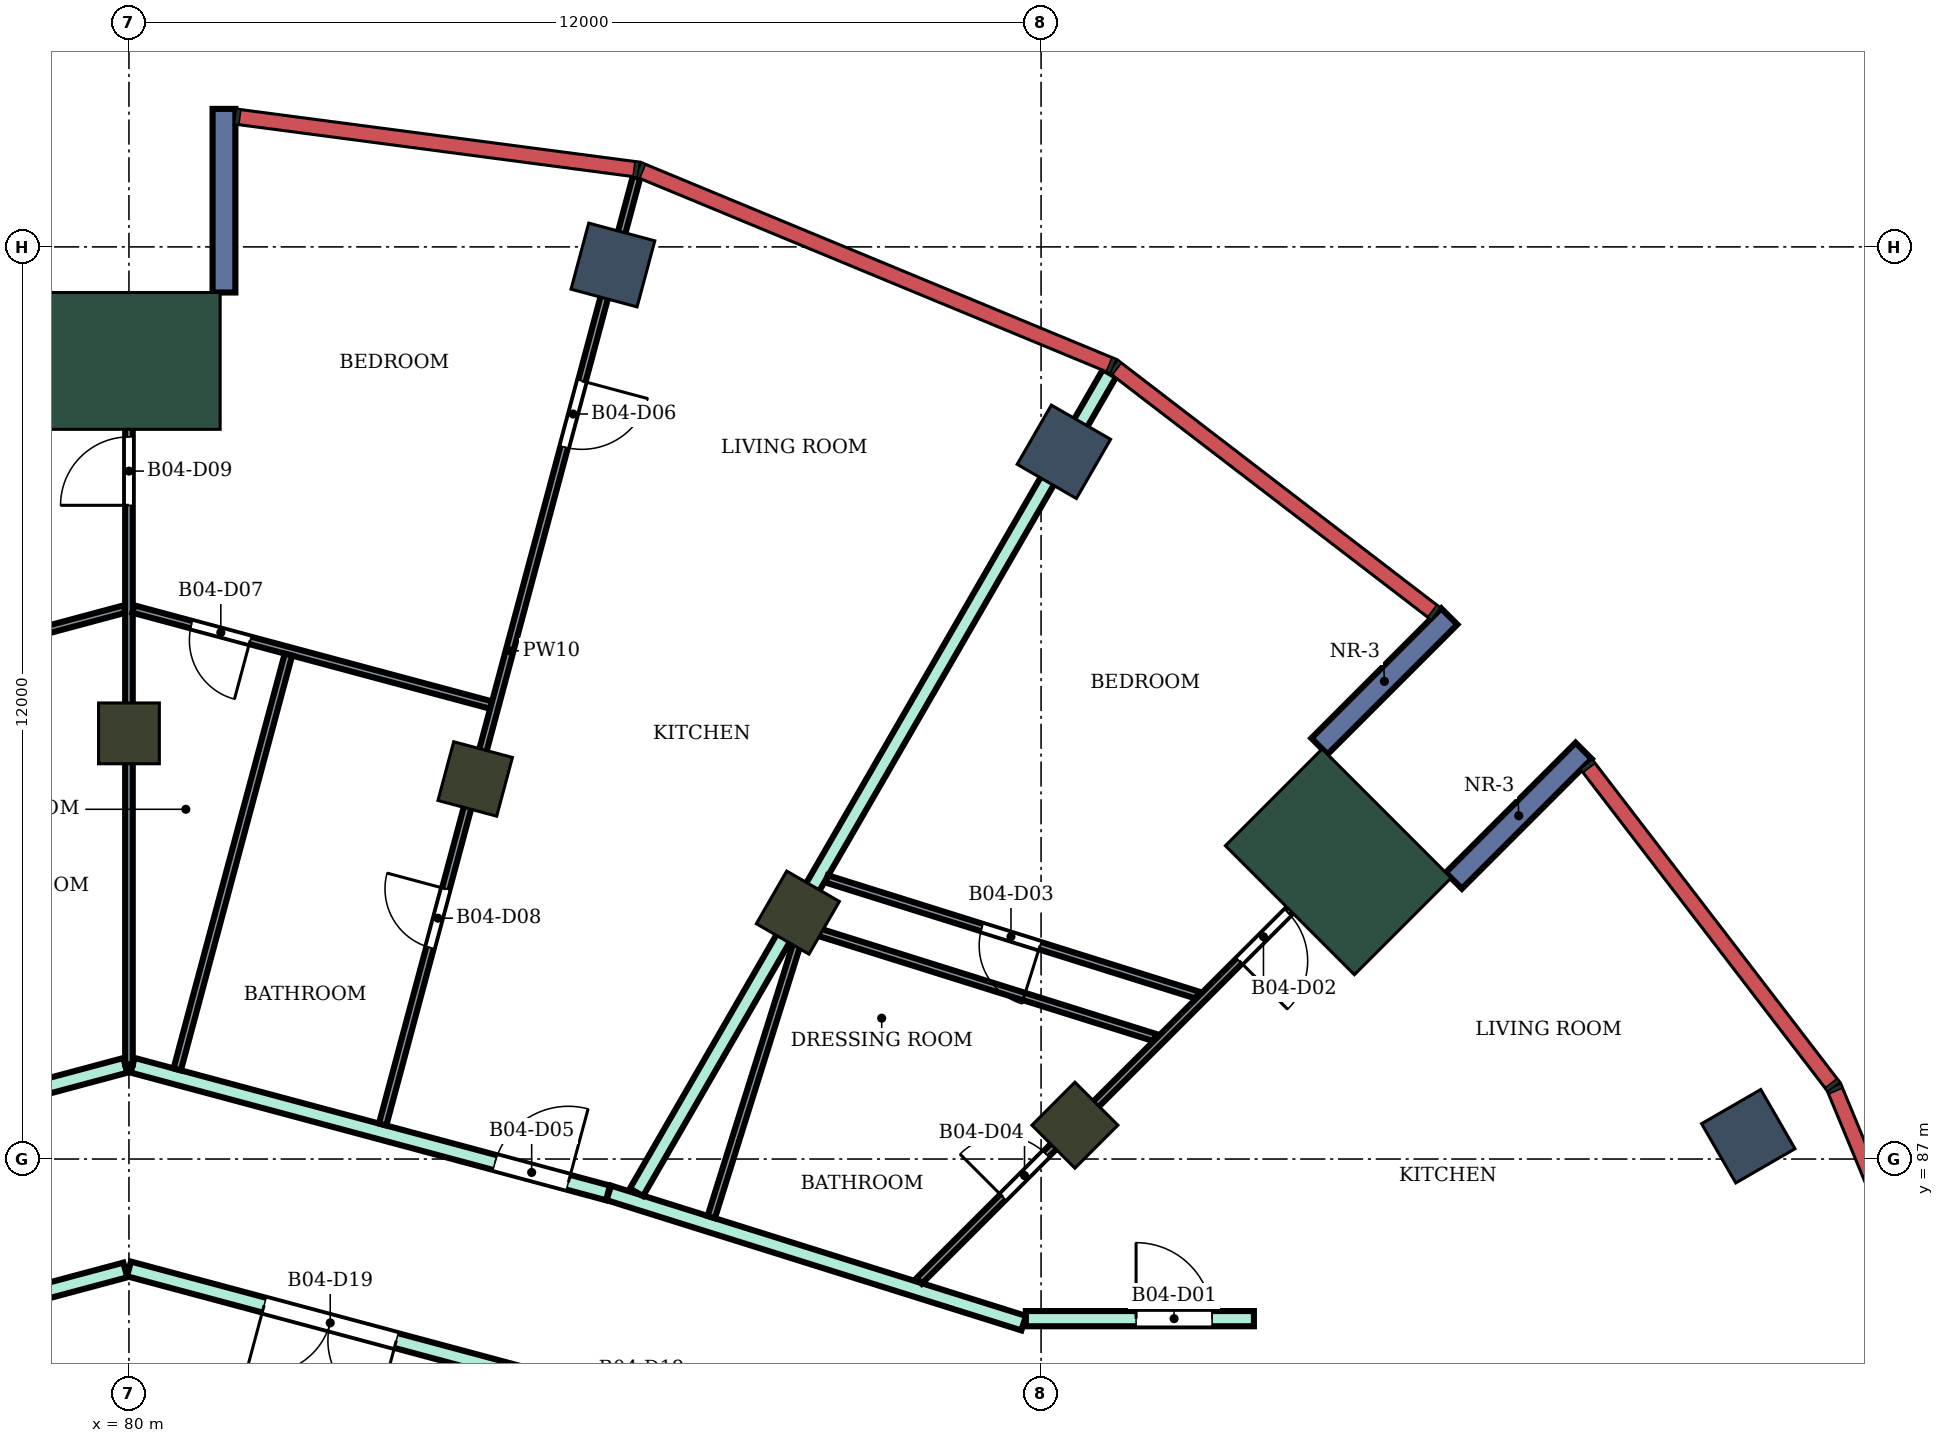
"""IFC4 building model, lengths in metres.
Left out: names, types, materials, properties, quantities, classifications, styles, units other than length and angle.
Written with IfcOpenShell. Run it as: python <this file> out.ifc"""

import sys

from ifc_helpers import new_model, si_unit, direction, frame, frame_2d, origin, origin_2d, place, context, subcontext, project, spatial, rectangle, extrude, element, fill, save


model = new_model("IFC4")
c1 = context("Model", 3, precision=1e-05, world=origin(), true_north=direction((0.0, 1.0)))
c2 = subcontext(c1, "Body", "Model", "MODEL_VIEW")
j1 = project(units=[si_unit("LENGTHUNIT", "METRE"), si_unit("PLANEANGLEUNIT", "RADIAN")], contexts=[c1])
p1 = place(None, origin())
s1 = spatial("IfcSite", under=j1, at=p1, CompositionType="ELEMENT")
p2 = place(p1, origin())
s2 = spatial("IfcBuilding", under=s1, at=p2, CompositionType="ELEMENT")
p3 = place(p2, frame((0.0, 0.0, 249.9)))
s3 = spatial("IfcBuildingStorey", under=s2, at=p3, CompositionType="ELEMENT", Elevation=249.9)
for number, where, z_axis, x_axis in (
    (1, (101.304, 87.3, 0.0), (0.0, 0.0, 1.0), (0.866, 0.5, 0.0)),
    (2, (92.3, 96.304, 0.0), (0.0, 0.0, 1.0), (0.5, 0.866, 0.0)),
    (3, (86.367, 98.762, 0.0), (0.0, 0.0, 1.0), (0.259, 0.966, 0.0)),
):
    element("IfcColumn", number, at=place(p3, frame(where, z_axis=z_axis, x_axis=x_axis)), inside=s3, PredefinedType="COLUMN", context=c2, shape_type="SweptSolid", body=[
        extrude(rectangle(XDim=0.9, YDim=0.9, at=origin_2d()), origin(), (0.0, 0.0, 1.0), 4.2),
    ])
for number, where, z_axis, x_axis in (
    (4, (92.445, 87.445, 0.0), (0.0, 0.0, 1.0), (0.707, 0.707, 0.0)),
    (5, (88.8, 90.242, 0.0), (0.0, 0.0, 1.0), (0.5, 0.866, 0.0)),
    (6, (84.555, 92.0, 0.0), (0.0, 0.0, 1.0), (0.259, 0.966, 0.0)),
    (7, (80.0, 92.6, 0.0), (0.0, 0.0, 1.0), (0.0, 1.0, 0.0)),
):
    element("IfcColumn", number, at=place(p3, frame(where, z_axis=z_axis, x_axis=x_axis)), inside=s3, PredefinedType="COLUMN", context=c2, shape_type="SweptSolid", body=[
        extrude(rectangle(XDim=0.8, YDim=0.8, at=origin_2d()), origin(), (0.0, 0.0, 1.0), 4.2),
    ])
for number, where, z_axis, x_axis in (
    (8, (95.91, 90.91, 0.0), (0.0, 0.0, 1.0), (0.707, 0.707, 0.0)),
    (9, (80.0, 97.5, 0.0), (0.0, 0.0, 1.0), (0.0, 1.0, 0.0)),
):
    element("IfcColumn", number, at=place(p3, frame(where, z_axis=z_axis, x_axis=x_axis)), inside=s3, PredefinedType="COLUMN", context=c2, shape_type="SweptSolid", body=[
        extrude(rectangle(XDim=1.8, YDim=2.4, at=origin_2d()), origin(), (0.0, 0.0, 1.0), 4.2),
    ])
for number, where, z_axis, x_axis in (
    (10, (97.43, 90.662, 0.0), (0.0, 0.0, 1.0), (0.707, 0.707, 0.0)),
    (11, (95.662, 92.43, 0.0), (0.0, 0.0, 1.0), (0.707, 0.707, 0.0)),
    (12, (81.25, 98.4, 0.0), (0.0, 0.0, 1.0), (0.0, 1.0, 0.0)),
):
    element("IfcWall", number, at=place(p3, frame(where, z_axis=z_axis, x_axis=x_axis)), inside=s3, PredefinedType="NOTDEFINED", context=c2, shape_type="SweptSolid", body=[
        extrude(rectangle(XDim=2.416, YDim=0.3, at=frame_2d((1.208, 0.0))), origin(), (0.0, 0.0, 1.0), 4.2),
    ])
p4 = place(p3, frame((73.687, 86.554, 0.0), z_axis=(0.0, 0.0, 1.0), x_axis=(0.965961994098, 0.258684027257, 0.0)))
e13 = element("IfcWall", 13, at=p4, inside=s3, PredefinedType="PARTITIONING", context=c2, shape_type="SweptSolid", body=[
    extrude(rectangle(XDim=6.486, YDim=0.2, at=frame_2d((3.243, 0.0))), origin(), (0.0, 0.0, 1.0), 3.75),
])
p5 = place(p4, frame((0.55, 0.0, 0.0)))
e14 = element("IfcOpeningElement", 14, at=p5, cuts=e13, PredefinedType="OPENING", context=c2, shape_type="SweptSolid", body=[
    extrude(rectangle(XDim=1.0, YDim=2.1, at=frame_2d((0.5, 1.05))), frame((0.0, 0.11, 0.0), z_axis=(0.0, -1.0, 0.0), x_axis=(1.0, 0.0, 0.0)), (0.0, 0.0, 1.0), 0.22),
])
p6 = place(p3, frame((74.413, 84.057, 0.0), z_axis=(0.0, 0.0, 1.0), x_axis=(0.965970849692, 0.258650956976, 0.0)))
e15 = element("IfcWall", 15, at=p6, inside=s3, PredefinedType="PARTITIONING", context=c2, shape_type="SweptSolid", body=[
    extrude(rectangle(XDim=5.734, YDim=0.2, at=frame_2d((2.867, 0.0))), origin(), (0.0, 0.0, 1.0), 3.75),
])
p7 = place(p3, frame((80.0, 85.554, 0.0), z_axis=(0.0, 0.0, 1.0), x_axis=(0.965894438951, -0.258936155845, 0.0)))
e16 = element("IfcWall", 16, at=p7, inside=s3, PredefinedType="PARTITIONING", context=c2, shape_type="SweptSolid", body=[
    extrude(rectangle(XDim=5.774, YDim=0.2, at=frame_2d((2.887, 0.0))), origin(), (0.0, 0.0, 1.0), 3.75),
])
p8 = place(p7, frame((1.841, 0.0, 0.0)))
e17 = element("IfcOpeningElement", 17, at=p8, cuts=e16, PredefinedType="OPENING", context=c2, shape_type="SweptSolid", body=[
    extrude(rectangle(XDim=1.8, YDim=2.1, at=frame_2d((0.9, 1.05))), frame((0.0, 0.11, 0.0), z_axis=(0.0, -1.0, 0.0), x_axis=(1.0, 0.0, 0.0)), (0.0, 0.0, 1.0), 0.22),
])
p9 = place(p3, frame((80.048, 88.233, 0.0), z_axis=(0.0, 0.0, 1.0), x_axis=(0.965787353661, -0.259335280109, 0.0)))
e18 = element("IfcWall", 18, at=p9, inside=s3, PredefinedType="PARTITIONING", context=c2, shape_type="SweptSolid", body=[
    extrude(rectangle(XDim=6.476, YDim=0.2, at=frame_2d((3.238, 0.0))), origin(), (0.0, 0.0, 1.0), 3.75),
])
p10 = place(p9, frame((4.936, 0.0, 0.0)))
e19 = element("IfcOpeningElement", 19, at=p10, cuts=e18, PredefinedType="OPENING", context=c2, shape_type="SweptSolid", body=[
    extrude(rectangle(XDim=1.0, YDim=2.1, at=frame_2d((0.5, 1.05))), frame((0.0, 0.11, 0.0), z_axis=(0.0, -1.0, 0.0), x_axis=(1.0, 0.0, 0.0)), (0.0, 0.0, 1.0), 0.22),
])
p11 = place(p3, frame((86.313, 86.554, 0.0), z_axis=(0.0, 0.0, 1.0), x_axis=(0.954077387881, -0.29956024091, 0.0)))
e20 = element("IfcWall", 20, at=p11, inside=s3, PredefinedType="PARTITIONING", context=c2, shape_type="SweptSolid", body=[
    extrude(rectangle(XDim=5.72, YDim=0.2, at=frame_2d((2.86, 0.0))), origin(), (0.0, 0.0, 1.0), 3.75),
])
p12 = place(p3, frame((86.677, 86.562, 0.0), z_axis=(0.0, 0.0, 1.0), x_axis=(0.500139020429, 0.865945125424, 0.0)))
e21 = element("IfcWall", 21, at=p12, inside=s3, PredefinedType="PARTITIONING", context=c2, shape_type="SweptSolid", body=[
    extrude(rectangle(XDim=12.446, YDim=0.2, at=frame_2d((6.223, 0.0))), origin(), (0.0, 0.0, 1.0), 3.75),
])
p13 = place(p3, frame((91.8, 84.9, 0.0), z_axis=(0.0, 0.0, 1.0), x_axis=(1.0, 0.0, 0.0)))
e22 = element("IfcWall", 22, at=p13, inside=s3, PredefinedType="PARTITIONING", context=c2, shape_type="SweptSolid", body=[
    extrude(rectangle(XDim=3.0, YDim=0.2, at=frame_2d((1.5, 0.0))), origin(), (0.0, 0.0, 1.0), 3.75),
])
p14 = place(p13, frame((1.45, 0.0, 0.0)))
e23 = element("IfcOpeningElement", 23, at=p14, cuts=e22, PredefinedType="OPENING", context=c2, shape_type="SweptSolid", body=[
    extrude(rectangle(XDim=1.0, YDim=2.1, at=frame_2d((0.5, 1.05))), frame((0.0, 0.11, 0.0), z_axis=(0.0, -1.0, 0.0), x_axis=(1.0, 0.0, 0.0)), (0.0, 0.0, 1.0), 0.22),
])
p15 = place(p3, frame((75.294, 92.989, 0.0), z_axis=(0.0, 0.0, 1.0), x_axis=(0.965836333205, 0.259152807165, 0.0)))
e24 = element("IfcWall", 24, at=p15, inside=s3, PredefinedType="PARTITIONING", context=c2, shape_type="SweptSolid", body=[
    extrude(rectangle(XDim=4.812, YDim=0.1, at=frame_2d((2.406, 0.0))), origin(), (0.0, 0.0, 1.0), 3.75),
])
p16 = place(p15, frame((1.981, 0.0, 0.0)))
e25 = element("IfcOpeningElement", 25, at=p16, cuts=e24, PredefinedType="OPENING", context=c2, shape_type="SweptSolid", body=[
    extrude(rectangle(XDim=0.8, YDim=2.1, at=frame_2d((0.4, 1.05))), frame((0.0, 0.06, 0.0), z_axis=(0.0, -1.0, 0.0), x_axis=(1.0, 0.0, 0.0)), (0.0, 0.0, 1.0), 0.12),
])
p17 = place(p3, frame((80.0, 88.246, 0.0), z_axis=(0.0, 0.0, 1.0), x_axis=(0.0, 1.0, 0.0)))
e26 = element("IfcWall", 26, at=p17, inside=s3, PredefinedType="PARTITIONING", context=c2, shape_type="SweptSolid", body=[
    extrude(rectangle(XDim=9.954, YDim=0.1, at=frame_2d((4.977, 0.0))), origin(), (0.0, 0.0, 1.0), 3.75),
])
p18 = place(p17, frame((7.354, 0.0, 0.0)))
e27 = element("IfcOpeningElement", 27, at=p18, cuts=e26, PredefinedType="OPENING", context=c2, shape_type="SweptSolid", body=[
    extrude(rectangle(XDim=0.9, YDim=2.1, at=frame_2d((0.45, 1.05))), frame((0.0, 0.06, 0.0), z_axis=(0.0, -1.0, 0.0), x_axis=(1.0, 0.0, 0.0)), (0.0, 0.0, 1.0), 0.12),
])
p19 = place(p3, frame((80.058, 94.235, 0.0), z_axis=(0.0, 0.0, 1.0), x_axis=(0.965831212389, -0.259171891173, 0.0)))
e28 = element("IfcWall", 28, at=p19, inside=s3, PredefinedType="PARTITIONING", context=c2, shape_type="SweptSolid", body=[
    extrude(rectangle(XDim=4.872, YDim=0.1, at=frame_2d((2.436, 0.0))), origin(), (0.0, 0.0, 1.0), 3.75),
])
p20 = place(p19, frame((0.792, 0.0, 0.0)))
e29 = element("IfcOpeningElement", 29, at=p20, cuts=e28, PredefinedType="OPENING", context=c2, shape_type="SweptSolid", body=[
    extrude(rectangle(XDim=0.8, YDim=2.1, at=frame_2d((0.4, 1.05))), frame((0.0, 0.06, 0.0), z_axis=(0.0, -1.0, 0.0), x_axis=(1.0, 0.0, 0.0)), (0.0, 0.0, 1.0), 0.12),
])
p21 = place(p3, frame((80.635, 88.179, 0.0), z_axis=(0.0, 0.0, 1.0), x_axis=(0.258942728312, 0.965892676986, 0.0)))
e30 = element("IfcWall", 30, at=p21, inside=s3, PredefinedType="PARTITIONING", context=c2, shape_type="SweptSolid", body=[
    extrude(rectangle(XDim=5.649, YDim=0.1, at=frame_2d((2.825, 0.0))), origin(), (0.0, 0.0, 1.0), 3.75),
])
p22 = place(p3, frame((83.338, 87.455, 0.0), z_axis=(0.0, 0.0, 1.0), x_axis=(0.25886596283, 0.965913253501, 0.0)))
e31 = element("IfcWall", 31, at=p22, inside=s3, PredefinedType="PARTITIONING", context=c2, shape_type="SweptSolid", body=[
    extrude(rectangle(XDim=12.904, YDim=0.1, at=frame_2d((6.452, 0.0))), origin(), (0.0, 0.0, 1.0), 3.75),
])
p23 = place(p22, frame((9.227, 0.0, 0.0)))
e32 = element("IfcOpeningElement", 32, at=p23, cuts=e31, PredefinedType="OPENING", context=c2, shape_type="SweptSolid", body=[
    extrude(rectangle(XDim=0.9, YDim=2.1, at=frame_2d((0.45, 1.05))), frame((0.0, 0.06, 0.0), z_axis=(0.0, -1.0, 0.0), x_axis=(1.0, 0.0, 0.0)), (0.0, 0.0, 1.0), 0.12),
])
p24 = place(p22, frame((2.409, 0.0, 0.0)))
e33 = element("IfcOpeningElement", 33, at=p24, cuts=e31, PredefinedType="OPENING", context=c2, shape_type="SweptSolid", body=[
    extrude(rectangle(XDim=0.8, YDim=2.1, at=frame_2d((0.4, 1.05))), frame((0.0, 0.06, 0.0), z_axis=(0.0, -1.0, 0.0), x_axis=(1.0, 0.0, 0.0)), (0.0, 0.0, 1.0), 0.12),
])
p25 = place(p3, frame((87.661, 86.236, 0.0), z_axis=(0.0, 0.0, 1.0), x_axis=(0.299267255743, 0.954169329648, 0.0)))
e34 = element("IfcWall", 34, at=p25, inside=s3, PredefinedType="PARTITIONING", context=c2, shape_type="SweptSolid", body=[
    extrude(rectangle(XDim=3.95, YDim=0.1, at=frame_2d((1.975, 0.0))), origin(), (0.0, 0.0, 1.0), 3.75),
])
p26 = place(p3, frame((88.858, 90.053, 0.0), z_axis=(0.0, 0.0, 1.0), x_axis=(0.954180222183, -0.299232524294, 0.0)))
e35 = element("IfcWall", 35, at=p26, inside=s3, PredefinedType="PARTITIONING", context=c2, shape_type="SweptSolid", body=[
    extrude(rectangle(XDim=4.863, YDim=0.1, at=frame_2d((2.431, 0.0))), origin(), (0.0, 0.0, 1.0), 3.75),
])
p27 = place(p3, frame((89.18, 90.685, 0.0), z_axis=(0.0, 0.0, 1.0), x_axis=(0.954251036713, -0.299006620215, 0.0)))
e36 = element("IfcWall", 36, at=p27, inside=s3, PredefinedType="PARTITIONING", context=c2, shape_type="SweptSolid", body=[
    extrude(rectangle(XDim=5.111, YDim=0.1, at=frame_2d((2.555, 0.0))), origin(), (0.0, 0.0, 1.0), 3.75),
])
p28 = place(p27, frame((2.14, 0.0, 0.0)))
e37 = element("IfcOpeningElement", 37, at=p28, cuts=e36, PredefinedType="OPENING", context=c2, shape_type="SweptSolid", body=[
    extrude(rectangle(XDim=0.8, YDim=2.1, at=frame_2d((0.4, 1.05))), frame((0.0, 0.06, 0.0), z_axis=(0.0, -1.0, 0.0), x_axis=(1.0, 0.0, 0.0)), (0.0, 0.0, 1.0), 0.12),
])
p29 = place(p3, frame((90.395, 85.395, 0.0), z_axis=(0.0, 0.0, 1.0), x_axis=(0.707279106146, 0.706934414221, 0.0)))
e38 = element("IfcWall", 38, at=p29, inside=s3, PredefinedType="PARTITIONING", context=c2, shape_type="SweptSolid", body=[
    extrude(rectangle(XDim=8.5, YDim=0.1, at=frame_2d((4.25, 0.0))), origin(), (0.0, 0.0, 1.0), 3.75),
])
p30 = place(p29, frame((5.957, 0.0, 0.0)))
e39 = element("IfcOpeningElement", 39, at=p30, cuts=e38, PredefinedType="OPENING", context=c2, shape_type="SweptSolid", body=[
    extrude(rectangle(XDim=0.9, YDim=2.1, at=frame_2d((0.45, 1.05))), frame((0.0, 0.06, 0.0), z_axis=(0.0, -1.0, 0.0), x_axis=(1.0, 0.0, 0.0)), (0.0, 0.0, 1.0), 0.12),
])
p31 = place(p29, frame((1.562, 0.0, 0.0)))
e40 = element("IfcOpeningElement", 40, at=p31, cuts=e38, PredefinedType="OPENING", context=c2, shape_type="SweptSolid", body=[
    extrude(rectangle(XDim=0.8, YDim=2.1, at=frame_2d((0.4, 1.05))), frame((0.0, 0.06, 0.0), z_axis=(0.0, -1.0, 0.0), x_axis=(1.0, 0.0, 0.0)), (0.0, 0.0, 1.0), 0.12),
])
p32 = place(p14, origin())
e41 = element("IfcDoor", 41, at=p32, inside=s3, OperationType="SINGLE_SWING_LEFT", PredefinedType="DOOR", context=c2, shape_type="SweptSolid", body=[
    extrude(rectangle(XDim=1.0, YDim=2.1, at=frame_2d((0.5, 1.05))), frame((0.0, 0.025, 0.0), z_axis=(0.0, -1.0, 0.0), x_axis=(1.0, 0.0, 0.0)), (0.0, 0.0, 1.0), 0.05),
])
fill(e23, e41)
p33 = place(p30, frame((0.9, 0.0, 0.0), z_axis=(0.0, 0.0, 1.0), x_axis=(-1.0, 0.0, 0.0)))
e42 = element("IfcDoor", 42, at=p33, inside=s3, OperationType="SINGLE_SWING_RIGHT", PredefinedType="DOOR", context=c2, shape_type="SweptSolid", body=[
    extrude(rectangle(XDim=0.9, YDim=2.1, at=frame_2d((0.45, 1.05))), frame((0.0, 0.025, 0.0), z_axis=(0.0, -1.0, 0.0), x_axis=(1.0, 0.0, 0.0)), (0.0, 0.0, 1.0), 0.05),
])
fill(e39, e42)
p34 = place(p28, frame((0.8, 0.0, 0.0), z_axis=(0.0, 0.0, 1.0), x_axis=(-1.0, 0.0, 0.0)))
e43 = element("IfcDoor", 43, at=p34, inside=s3, OperationType="SINGLE_SWING_LEFT", PredefinedType="DOOR", context=c2, shape_type="SweptSolid", body=[
    extrude(rectangle(XDim=0.8, YDim=2.1, at=frame_2d((0.4, 1.05))), frame((0.0, 0.025, 0.0), z_axis=(0.0, -1.0, 0.0), x_axis=(1.0, 0.0, 0.0)), (0.0, 0.0, 1.0), 0.05),
])
fill(e37, e43)
p35 = place(p31, origin())
e44 = element("IfcDoor", 44, at=p35, inside=s3, OperationType="SINGLE_SWING_LEFT", PredefinedType="DOOR", context=c2, shape_type="SweptSolid", body=[
    extrude(rectangle(XDim=0.8, YDim=2.1, at=frame_2d((0.4, 1.05))), frame((0.0, 0.025, 0.0), z_axis=(0.0, -1.0, 0.0), x_axis=(1.0, 0.0, 0.0)), (0.0, 0.0, 1.0), 0.05),
])
fill(e40, e44)
p36 = place(p10, origin())
e45 = element("IfcDoor", 45, at=p36, inside=s3, OperationType="SINGLE_SWING_RIGHT", PredefinedType="DOOR", context=c2, shape_type="SweptSolid", body=[
    extrude(rectangle(XDim=1.0, YDim=2.1, at=frame_2d((0.5, 1.05))), frame((0.0, 0.025, 0.0), z_axis=(0.0, -1.0, 0.0), x_axis=(1.0, 0.0, 0.0)), (0.0, 0.0, 1.0), 0.05),
])
fill(e19, e45)
p37 = place(p23, frame((0.9, 0.0, 0.0), z_axis=(0.0, 0.0, 1.0), x_axis=(-1.0, 0.0, 0.0)))
e46 = element("IfcDoor", 46, at=p37, inside=s3, OperationType="SINGLE_SWING_LEFT", PredefinedType="DOOR", context=c2, shape_type="SweptSolid", body=[
    extrude(rectangle(XDim=0.9, YDim=2.1, at=frame_2d((0.45, 1.05))), frame((0.0, 0.025, 0.0), z_axis=(0.0, -1.0, 0.0), x_axis=(1.0, 0.0, 0.0)), (0.0, 0.0, 1.0), 0.05),
])
fill(e32, e46)
p38 = place(p20, frame((0.8, 0.0, 0.0), z_axis=(0.0, 0.0, 1.0), x_axis=(-1.0, 0.0, 0.0)))
e47 = element("IfcDoor", 47, at=p38, inside=s3, OperationType="SINGLE_SWING_LEFT", PredefinedType="DOOR", context=c2, shape_type="SweptSolid", body=[
    extrude(rectangle(XDim=0.8, YDim=2.1, at=frame_2d((0.4, 1.05))), frame((0.0, 0.025, 0.0), z_axis=(0.0, -1.0, 0.0), x_axis=(1.0, 0.0, 0.0)), (0.0, 0.0, 1.0), 0.05),
])
fill(e29, e47)
p39 = place(p24, origin())
e48 = element("IfcDoor", 48, at=p39, inside=s3, OperationType="SINGLE_SWING_RIGHT", PredefinedType="DOOR", context=c2, shape_type="SweptSolid", body=[
    extrude(rectangle(XDim=0.8, YDim=2.1, at=frame_2d((0.4, 1.05))), frame((0.0, 0.025, 0.0), z_axis=(0.0, -1.0, 0.0), x_axis=(1.0, 0.0, 0.0)), (0.0, 0.0, 1.0), 0.05),
])
fill(e33, e48)
p40 = place(p18, origin())
e49 = element("IfcDoor", 49, at=p40, inside=s3, OperationType="SINGLE_SWING_LEFT", PredefinedType="DOOR", context=c2, shape_type="SweptSolid", body=[
    extrude(rectangle(XDim=0.9, YDim=2.1, at=frame_2d((0.45, 1.05))), frame((0.0, 0.025, 0.0), z_axis=(0.0, -1.0, 0.0), x_axis=(1.0, 0.0, 0.0)), (0.0, 0.0, 1.0), 0.05),
])
fill(e27, e49)
p41 = place(p8, frame((1.8, 0.0, 0.0), z_axis=(0.0, 0.0, 1.0), x_axis=(-1.0, 0.0, 0.0)))
e50 = element("IfcDoor", 50, at=p41, inside=s3, OperationType="DOUBLE_DOOR_SINGLE_SWING", PredefinedType="DOOR", context=c2, shape_type="SweptSolid", body=[
    extrude(rectangle(XDim=1.8, YDim=2.1, at=frame_2d((0.9, 1.05))), frame((0.0, 0.025, 0.0), z_axis=(0.0, -1.0, 0.0), x_axis=(1.0, 0.0, 0.0)), (0.0, 0.0, 1.0), 0.05),
])
fill(e17, e50)
save(model, sys.argv[1])
